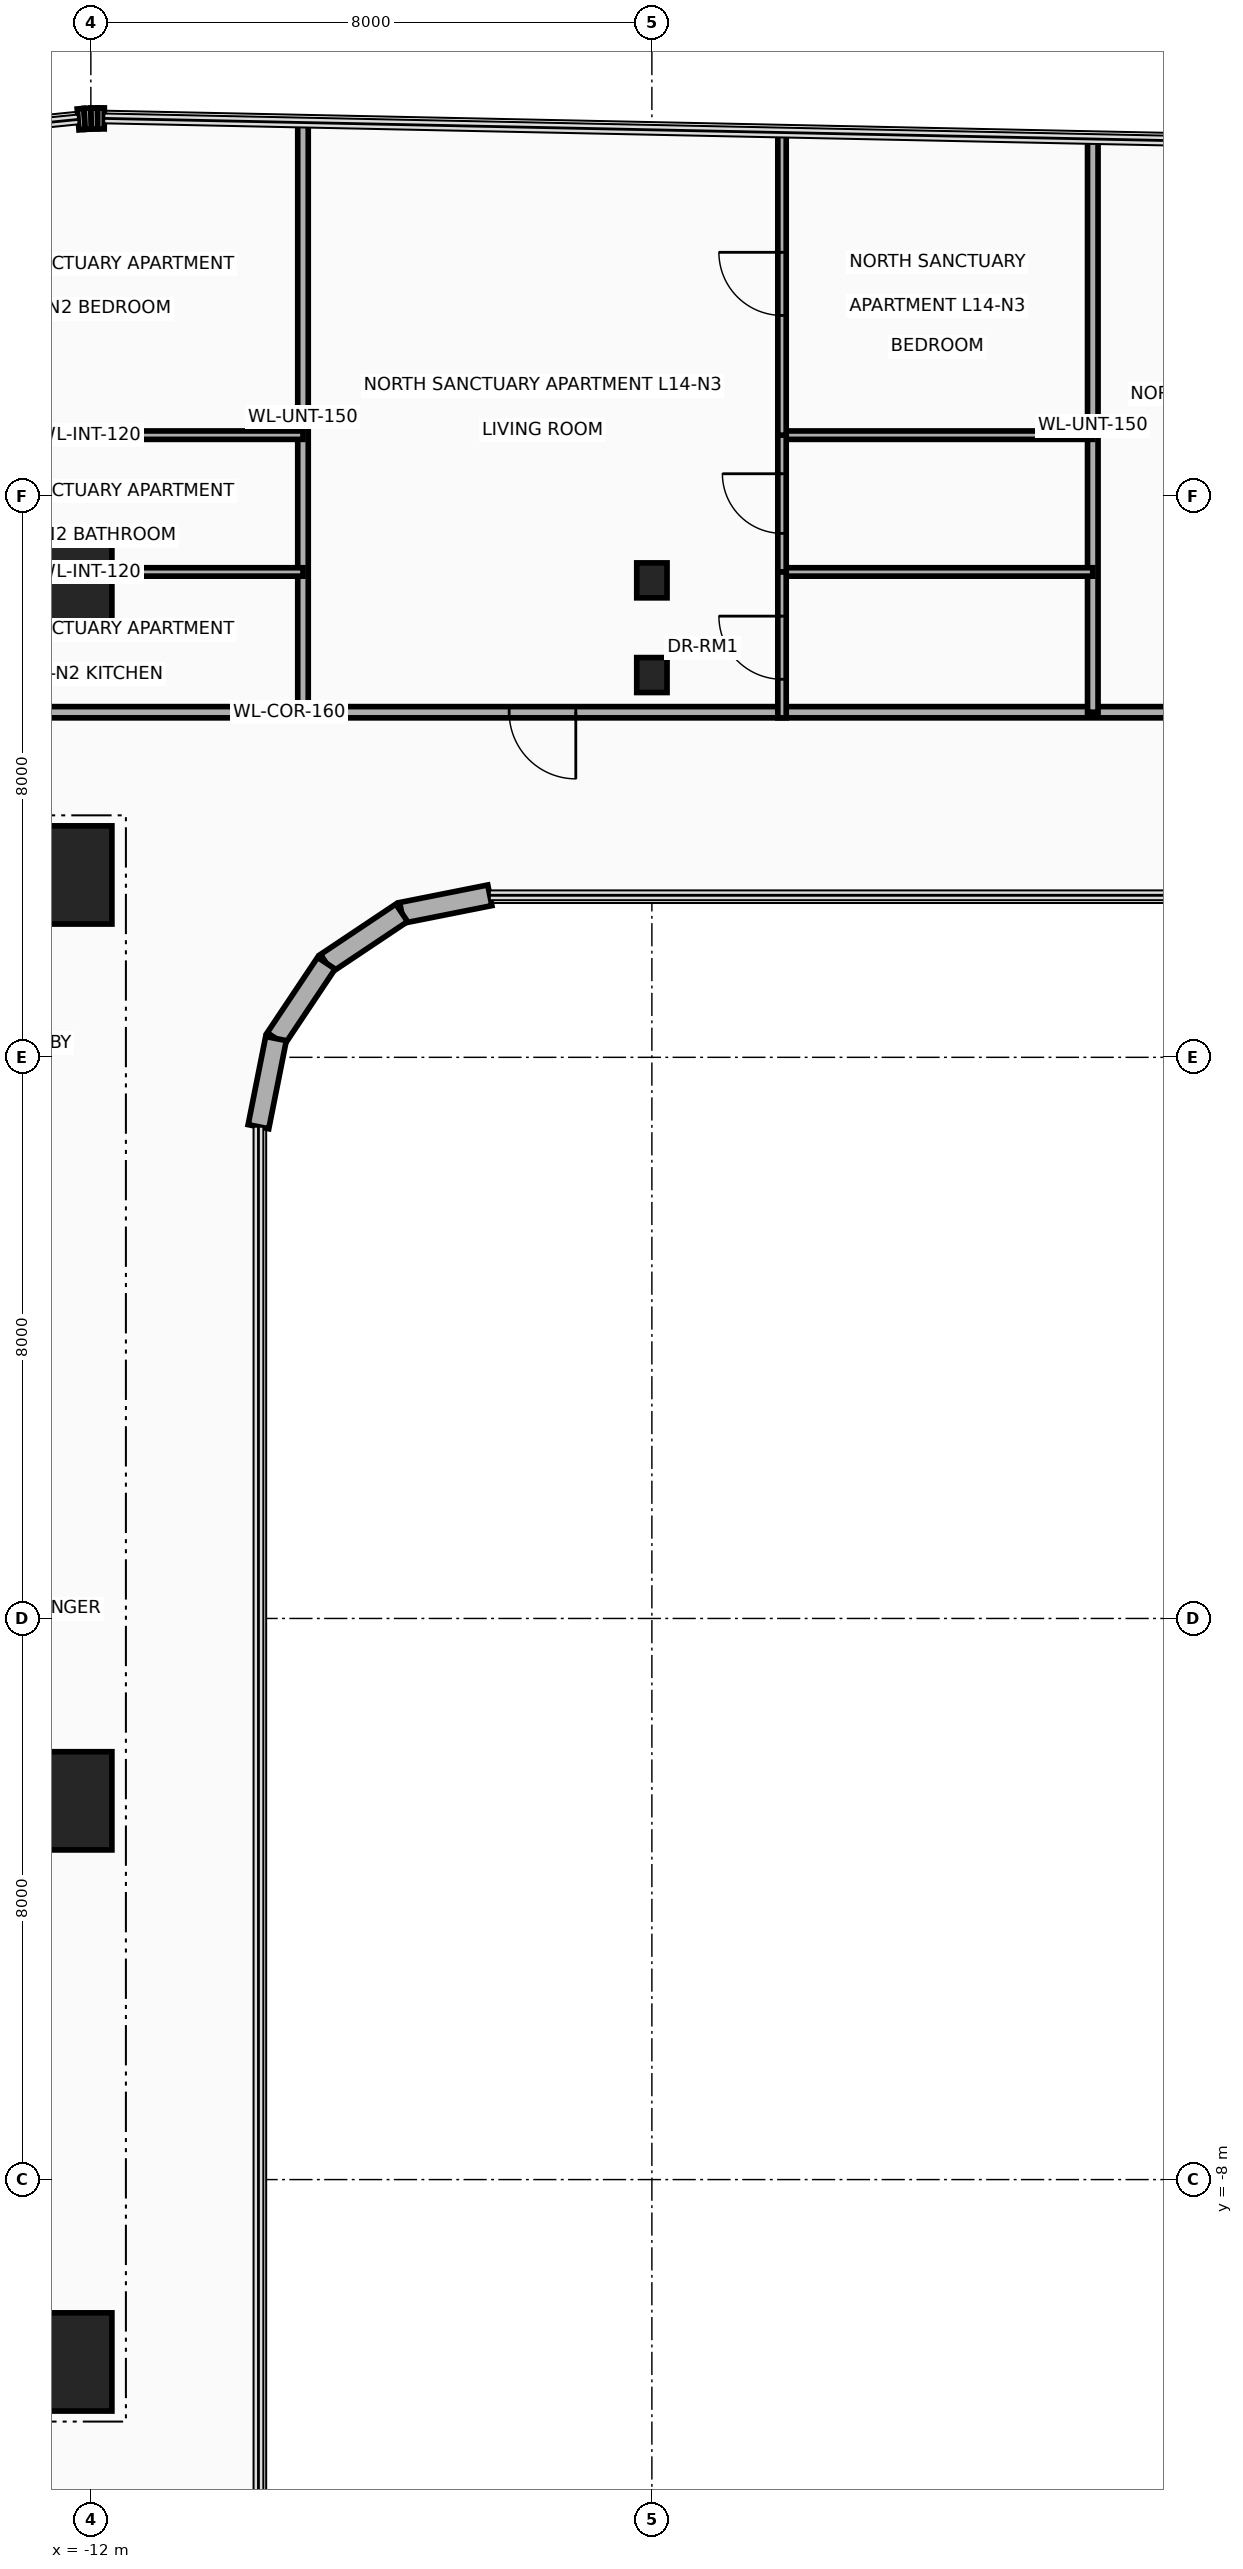
"""IFC4 building model, lengths in metres.
Left out: names, types, materials, properties, quantities, classifications, styles, units other than length and angle.
Written with IfcOpenShell. Run it as: python <this file> out.ifc"""

import sys

from ifc_helpers import new_model, si_unit, direction, frame, frame_2d, origin, origin_2d, place, context, subcontext, project, spatial, rectangle, i_section, extrude, source, transform, mapped, element, fill, save


model = new_model("IFC4")
c1 = context("Model", 3, precision=1e-05, world=origin(), true_north=direction((0.0, 1.0)))
c2 = subcontext(c1, "Body", "Model", "MODEL_VIEW")
j1 = project(units=[si_unit("LENGTHUNIT", "METRE"), si_unit("PLANEANGLEUNIT", "RADIAN")], contexts=[c1])
p1 = place(None, origin())
s1 = spatial("IfcSite", under=j1, at=p1, CompositionType="ELEMENT")
p2 = place(p1, origin())
s2 = spatial("IfcBuilding", under=s1, at=p2, CompositionType="ELEMENT")
p3 = place(p2, frame((0.0, 0.0, 59.3)))
s3 = spatial("IfcBuildingStorey", under=s2, at=p3, CompositionType="ELEMENT", Elevation=59.3)
for number, where, z_axis, x_axis in (
    (1, (-22.65, 10.8, 0.0), (0.0, 0.0, 1.0), (1.0, 0.0, 0.0)),
    (2, (-22.65, -10.8, 0.0), (0.0, 0.0, 1.0), (1.0, 0.0, 0.0)),
):
    element("IfcWall", number, at=place(p3, frame(where, z_axis=z_axis, x_axis=x_axis)), inside=s3, PredefinedType="SHEAR", context=c2, shape_type="SweptSolid", body=[
        extrude(rectangle(XDim=10.25, YDim=0.7, at=frame_2d((5.125, 0.0))), origin(), (0.0, 0.0, 1.0), 3.46),
    ])
m1 = source(origin(), c2, "Body", "SweptSolid", [
    extrude(rectangle(XDim=1.4, YDim=1.4, at=origin_2d()), origin(), (0.0, 0.0, 1.0), 3.7),
])
for number, where, z_axis, x_axis in (
    (3, (-12.4, -10.6, 0.0), (0.0, 0.0, 1.0), (1.0, 0.0, 0.0)),
    (4, (-12.4, -2.6, 0.0), (0.0, 0.0, 1.0), (1.0, 0.0, 0.0)),
    (5, (-12.4, 10.6, 0.0), (0.0, 0.0, 1.0), (1.0, 0.0, 0.0)),
    (6, (-12.4, 14.8, 0.0), (0.0, 0.0, 1.0), (1.0, 0.0, 0.0)),
):
    element("IfcColumn", number, at=place(p3, frame(where, z_axis=z_axis, x_axis=x_axis)), inside=s3, PredefinedType="COLUMN", context=c2, shape_type="MappedRepresentation", body=[
        mapped(m1, transform((0.0, 0.0, 0.0), x_axis=(1.0, 0.0, 0.0), y_axis=(0.0, 1.0, 0.0), z_axis=(0.0, 0.0, 1.0), scale=1.0)),
    ])
m2 = source(origin(), c2, "Body", "SweptSolid", [
    extrude(i_section(OverallWidth=0.432, OverallDepth=0.498, WebThickness=0.056, FlangeThickness=0.089, at=origin_2d()), origin(), (0.0, 0.0, 1.0), 3.7),
])
for number, where, z_axis, x_axis in (
    (7, (-4.0, 13.45, 0.0), (0.0, 0.0, 1.0), (1.0, 0.0, 0.0)),
    (8, (-4.0, 14.8, 0.0), (0.0, 0.0, 1.0), (1.0, 0.0, 0.0)),
):
    element("IfcColumn", number, at=place(p3, frame(where, z_axis=z_axis, x_axis=x_axis)), inside=s3, PredefinedType="COLUMN", context=c2, shape_type="MappedRepresentation", body=[
        mapped(m2, transform((0.0, 0.0, 0.0), x_axis=(1.0, 0.0, 0.0), y_axis=(0.0, 1.0, 0.0), z_axis=(0.0, 0.0, 1.0), scale=1.0)),
    ])
p4 = place(p3, frame((-12.182, 21.371, 0.0), z_axis=(0.0, 0.0, 1.0), x_axis=(0.996527790842, 0.08326080759, 0.0)))
e9 = element("IfcWall", 9, at=p4, inside=s3, PredefinedType="SOLIDWALL", context=c2, shape_type="SweptSolid", body=[
    extrude(rectangle(XDim=0.094, YDim=0.3, at=frame_2d((0.047, 0.0))), origin(), (0.0, 0.0, 1.0), 3.46),
])
p5 = place(p3, frame((-12.088, 21.379, 0.0), z_axis=(0.0, 0.0, 1.0), x_axis=(0.998476480444, 0.055178963393, 0.0)))
e10 = element("IfcWall", 10, at=p5, inside=s3, PredefinedType="SOLIDWALL", context=c2, shape_type="SweptSolid", body=[
    extrude(rectangle(XDim=0.093, YDim=0.3, at=frame_2d((0.046, 0.0))), origin(), (0.0, 0.0, 1.0), 3.46),
])
p6 = place(p3, frame((-11.996, 21.384, 0.0), z_axis=(0.0, 0.0, 1.0), x_axis=(0.999722573757, 0.023553673204, 0.0)))
e11 = element("IfcWall", 11, at=p6, inside=s3, PredefinedType="SOLIDWALL", context=c2, shape_type="SweptSolid", body=[
    extrude(rectangle(XDim=0.093, YDim=0.3, at=frame_2d((0.047, 0.0))), origin(), (0.0, 0.0, 1.0), 3.46),
])
p7 = place(p3, frame((-11.902, 21.386, 0.0), z_axis=(0.0, 0.0, 1.0), x_axis=(0.999986507273, -0.005194735103, 0.0)))
e12 = element("IfcWall", 12, at=p7, inside=s3, PredefinedType="SOLIDWALL", context=c2, shape_type="SweptSolid", body=[
    extrude(rectangle(XDim=0.094, YDim=0.3, at=frame_2d((0.047, 0.0))), origin(), (0.0, 0.0, 1.0), 3.46),
])
p8 = place(p3, frame((-6.311, 10.31, 0.0), z_axis=(0.0, 0.0, 1.0), x_axis=(-0.980778058848, -0.195126623715, 0.0)))
e13 = element("IfcWall", 13, at=p8, inside=s3, PredefinedType="SOLIDWALL", context=c2, shape_type="SweptSolid", body=[
    extrude(rectangle(XDim=1.281, YDim=0.3, at=frame_2d((0.641, 0.0))), origin(), (0.0, 0.0, 1.0), 3.46),
])
p9 = place(p3, frame((-7.567, 10.06, 0.0), z_axis=(0.0, 0.0, 1.0), x_axis=(-0.831497739511, -0.555528135371, 0.0)))
e14 = element("IfcWall", 14, at=p9, inside=s3, PredefinedType="SOLIDWALL", context=c2, shape_type="SweptSolid", body=[
    extrude(rectangle(XDim=1.292, YDim=0.3, at=frame_2d((0.646, 0.0))), origin(), (0.0, 0.0, 1.0), 3.46),
])
p10 = place(p3, frame((-8.642, 9.342, 0.0), z_axis=(0.0, 0.0, 1.0), x_axis=(-0.555615398575, -0.831439431869, 0.0)))
e15 = element("IfcWall", 15, at=p10, inside=s3, PredefinedType="SOLIDWALL", context=c2, shape_type="SweptSolid", body=[
    extrude(rectangle(XDim=1.292, YDim=0.3, at=frame_2d((0.646, 0.0))), origin(), (0.0, 0.0, 1.0), 3.46),
])
p11 = place(p3, frame((-9.36, 8.268, 0.0), z_axis=(0.0, 0.0, 1.0), x_axis=(-0.195090163074, -0.980785312019, 0.0)))
e16 = element("IfcWall", 16, at=p11, inside=s3, PredefinedType="SOLIDWALL", context=c2, shape_type="SweptSolid", body=[
    extrude(rectangle(XDim=1.281, YDim=0.3, at=frame_2d((0.641, 0.0))), origin(), (0.0, 0.0, 1.0), 3.46),
])
p12 = place(p3, frame((-31.89, 12.92, 0.0), z_axis=(0.0, 0.0, 1.0), x_axis=(1.0, 0.0, 0.0)))
e17 = element("IfcWall", 17, at=p12, inside=s3, PredefinedType="PARTITIONING", context=c2, shape_type="SweptSolid", body=[
    extrude(rectangle(XDim=45.44, YDim=0.16, at=frame_2d((22.72, 0.0))), origin(), (0.0, 0.0, 1.0), 2.583),
])
p13 = place(p12, frame((2.88, 0.0, 0.0)))
e18 = element("IfcOpeningElement", 18, at=p13, cuts=e17, PredefinedType="OPENING", context=c2, shape_type="SweptSolid", body=[
    extrude(rectangle(XDim=0.95, YDim=2.15, at=frame_2d((0.475, 1.075))), frame((0.0, 0.095, 0.0), z_axis=(0.0, -1.0, 0.0), x_axis=(1.0, 0.0, 0.0)), (0.0, 0.0, 1.0), 0.19),
])
p14 = place(p12, frame((13.768, 0.0, 0.0)))
e19 = element("IfcOpeningElement", 19, at=p14, cuts=e17, PredefinedType="OPENING", context=c2, shape_type="SweptSolid", body=[
    extrude(rectangle(XDim=0.95, YDim=2.15, at=frame_2d((0.475, 1.075))), frame((0.0, 0.095, 0.0), z_axis=(0.0, -1.0, 0.0), x_axis=(1.0, 0.0, 0.0)), (0.0, 0.0, 1.0), 0.19),
])
p15 = place(p12, frame((25.855, 0.0, 0.0)))
e20 = element("IfcOpeningElement", 20, at=p15, cuts=e17, PredefinedType="OPENING", context=c2, shape_type="SweptSolid", body=[
    extrude(rectangle(XDim=0.95, YDim=2.15, at=frame_2d((0.475, 1.075))), frame((0.0, 0.095, 0.0), z_axis=(0.0, -1.0, 0.0), x_axis=(1.0, 0.0, 0.0)), (0.0, 0.0, 1.0), 0.19),
])
p16 = place(p12, frame((36.292, 0.0, 0.0)))
e21 = element("IfcOpeningElement", 21, at=p16, cuts=e17, PredefinedType="OPENING", context=c2, shape_type="SweptSolid", body=[
    extrude(rectangle(XDim=0.95, YDim=2.15, at=frame_2d((0.475, 1.075))), frame((0.0, 0.095, 0.0), z_axis=(0.0, -1.0, 0.0), x_axis=(1.0, 0.0, 0.0)), (0.0, 0.0, 1.0), 0.19),
])
p17 = place(p3, frame((-8.975, 12.92, 0.0), z_axis=(0.0, 0.0, 1.0), x_axis=(0.0, 1.0, 0.0)))
e22 = element("IfcWall", 22, at=p17, inside=s3, PredefinedType="PARTITIONING", context=c2, shape_type="SweptSolid", body=[
    extrude(rectangle(XDim=8.407, YDim=0.15, at=frame_2d((4.204, 0.0))), origin(), (0.0, 0.0, 1.0), 2.583),
])
p18 = place(p3, frame((2.287, 12.92, 0.0), z_axis=(0.0, 0.0, 1.0), x_axis=(0.0, 1.0, 0.0)))
e23 = element("IfcWall", 23, at=p18, inside=s3, PredefinedType="PARTITIONING", context=c2, shape_type="SweptSolid", body=[
    extrude(rectangle(XDim=8.172, YDim=0.15, at=frame_2d((4.086, 0.0))), origin(), (0.0, 0.0, 1.0), 2.583),
])
p19 = place(p3, frame((-15.057, 14.92, 0.0), z_axis=(0.0, 0.0, 1.0), x_axis=(1.0, 0.0, 0.0)))
e24 = element("IfcWall", 24, at=p19, inside=s3, PredefinedType="PARTITIONING", context=c2, shape_type="SweptSolid", body=[
    extrude(rectangle(XDim=6.082, YDim=0.12, at=frame_2d((3.041, 0.0))), origin(), (0.0, 0.0, 1.0), 2.583),
])
p20 = place(p3, frame((-15.057, 16.87, 0.0), z_axis=(0.0, 0.0, 1.0), x_axis=(1.0, 0.0, 0.0)))
e25 = element("IfcWall", 25, at=p20, inside=s3, PredefinedType="PARTITIONING", context=c2, shape_type="SweptSolid", body=[
    extrude(rectangle(XDim=6.082, YDim=0.12, at=frame_2d((3.041, 0.0))), origin(), (0.0, 0.0, 1.0), 3.46),
])
p21 = place(p3, frame((-2.145, 14.92, 0.0), z_axis=(0.0, 0.0, 1.0), x_axis=(1.0, 0.0, 0.0)))
e26 = element("IfcWall", 26, at=p21, inside=s3, PredefinedType="PARTITIONING", context=c2, shape_type="SweptSolid", body=[
    extrude(rectangle(XDim=4.432, YDim=0.12, at=frame_2d((2.216, 0.0))), origin(), (0.0, 0.0, 1.0), 2.583),
])
p22 = place(p3, frame((-2.145, 16.87, 0.0), z_axis=(0.0, 0.0, 1.0), x_axis=(1.0, 0.0, 0.0)))
e27 = element("IfcWall", 27, at=p22, inside=s3, PredefinedType="PARTITIONING", context=c2, shape_type="SweptSolid", body=[
    extrude(rectangle(XDim=4.432, YDim=0.12, at=frame_2d((2.216, 0.0))), origin(), (0.0, 0.0, 1.0), 3.46),
])
p23 = place(p3, frame((-2.145, 14.92, 0.0), z_axis=(0.0, 0.0, 1.0), x_axis=(0.0, 1.0, 0.0)))
e28 = element("IfcWall", 28, at=p23, inside=s3, PredefinedType="PARTITIONING", context=c2, shape_type="SweptSolid", body=[
    extrude(rectangle(XDim=1.95, YDim=0.12, at=frame_2d((0.975, 0.0))), origin(), (0.0, 0.0, 1.0), 2.583),
])
p24 = place(p23, frame((0.55, 0.0, 0.0)))
e29 = element("IfcOpeningElement", 29, at=p24, cuts=e28, PredefinedType="OPENING", context=c2, shape_type="SweptSolid", body=[
    extrude(rectangle(XDim=0.85, YDim=2.1, at=frame_2d((0.425, 1.05))), frame((0.0, 0.075, 0.0), z_axis=(0.0, -1.0, 0.0), x_axis=(1.0, 0.0, 0.0)), (0.0, 0.0, 1.0), 0.15),
])
p25 = place(p3, frame((-2.145, 12.84, 0.0), z_axis=(0.0, 0.0, 1.0), x_axis=(0.0, 1.0, 0.0)))
e30 = element("IfcWall", 30, at=p25, inside=s3, PredefinedType="PARTITIONING", context=c2, shape_type="SweptSolid", body=[
    extrude(rectangle(XDim=2.08, YDim=0.12, at=frame_2d((1.04, 0.0))), origin(), (0.0, 0.0, 1.0), 2.583),
])
p26 = place(p25, frame((0.55, 0.0, 0.0)))
e31 = element("IfcOpeningElement", 31, at=p26, cuts=e30, PredefinedType="OPENING", context=c2, shape_type="SweptSolid", body=[
    extrude(rectangle(XDim=0.9, YDim=2.1, at=frame_2d((0.45, 1.05))), frame((0.0, 0.075, 0.0), z_axis=(0.0, -1.0, 0.0), x_axis=(1.0, 0.0, 0.0)), (0.0, 0.0, 1.0), 0.15),
])
p27 = place(p3, frame((-2.145, 16.87, 0.0), z_axis=(0.0, 0.0, 1.0), x_axis=(0.0, 1.0, 0.0)))
e32 = element("IfcWall", 32, at=p27, inside=s3, PredefinedType="PARTITIONING", context=c2, shape_type="SweptSolid", body=[
    extrude(rectangle(XDim=4.315, YDim=0.12, at=frame_2d((2.157, 0.0))), origin(), (0.0, 0.0, 1.0), 3.46),
])
p28 = place(p27, frame((1.707, 0.0, 0.0)))
e33 = element("IfcOpeningElement", 33, at=p28, cuts=e32, PredefinedType="OPENING", context=c2, shape_type="SweptSolid", body=[
    extrude(rectangle(XDim=0.9, YDim=2.1, at=frame_2d((0.45, 1.05))), frame((0.0, 0.075, 0.0), z_axis=(0.0, -1.0, 0.0), x_axis=(1.0, 0.0, 0.0)), (0.0, 0.0, 1.0), 0.15),
])
p29 = place(p15, frame((0.95, 0.0, 0.0), z_axis=(0.0, 0.0, 1.0), x_axis=(-1.0, 0.0, 0.0)))
e34 = element("IfcDoor", 34, at=p29, inside=s3, OperationType="SINGLE_SWING_LEFT", PredefinedType="DOOR", context=c2, shape_type="SweptSolid", body=[
    extrude(rectangle(XDim=0.95, YDim=2.15, at=frame_2d((0.475, 1.075))), frame((0.0, 0.025, 0.0), z_axis=(0.0, -1.0, 0.0), x_axis=(1.0, 0.0, 0.0)), (0.0, 0.0, 1.0), 0.05),
])
fill(e20, e34)
p30 = place(p24, origin())
e35 = element("IfcDoor", 35, at=p30, inside=s3, OperationType="SINGLE_SWING_RIGHT", PredefinedType="DOOR", context=c2, shape_type="SweptSolid", body=[
    extrude(rectangle(XDim=0.85, YDim=2.1, at=frame_2d((0.425, 1.05))), frame((0.0, 0.025, 0.0), z_axis=(0.0, -1.0, 0.0), x_axis=(1.0, 0.0, 0.0)), (0.0, 0.0, 1.0), 0.05),
])
fill(e29, e35)
p31 = place(p26, origin())
e36 = element("IfcDoor", 36, at=p31, inside=s3, OperationType="SINGLE_SWING_LEFT", PredefinedType="DOOR", context=c2, shape_type="SweptSolid", body=[
    extrude(rectangle(XDim=0.9, YDim=2.1, at=frame_2d((0.45, 1.05))), frame((0.0, 0.025, 0.0), z_axis=(0.0, -1.0, 0.0), x_axis=(1.0, 0.0, 0.0)), (0.0, 0.0, 1.0), 0.05),
])
fill(e31, e36)
p32 = place(p28, origin())
e37 = element("IfcDoor", 37, at=p32, inside=s3, OperationType="SINGLE_SWING_RIGHT", PredefinedType="DOOR", context=c2, shape_type="SweptSolid", body=[
    extrude(rectangle(XDim=0.9, YDim=2.1, at=frame_2d((0.45, 1.05))), frame((0.0, 0.025, 0.0), z_axis=(0.0, -1.0, 0.0), x_axis=(1.0, 0.0, 0.0)), (0.0, 0.0, 1.0), 0.05),
])
fill(e33, e37)
save(model, sys.argv[1])
